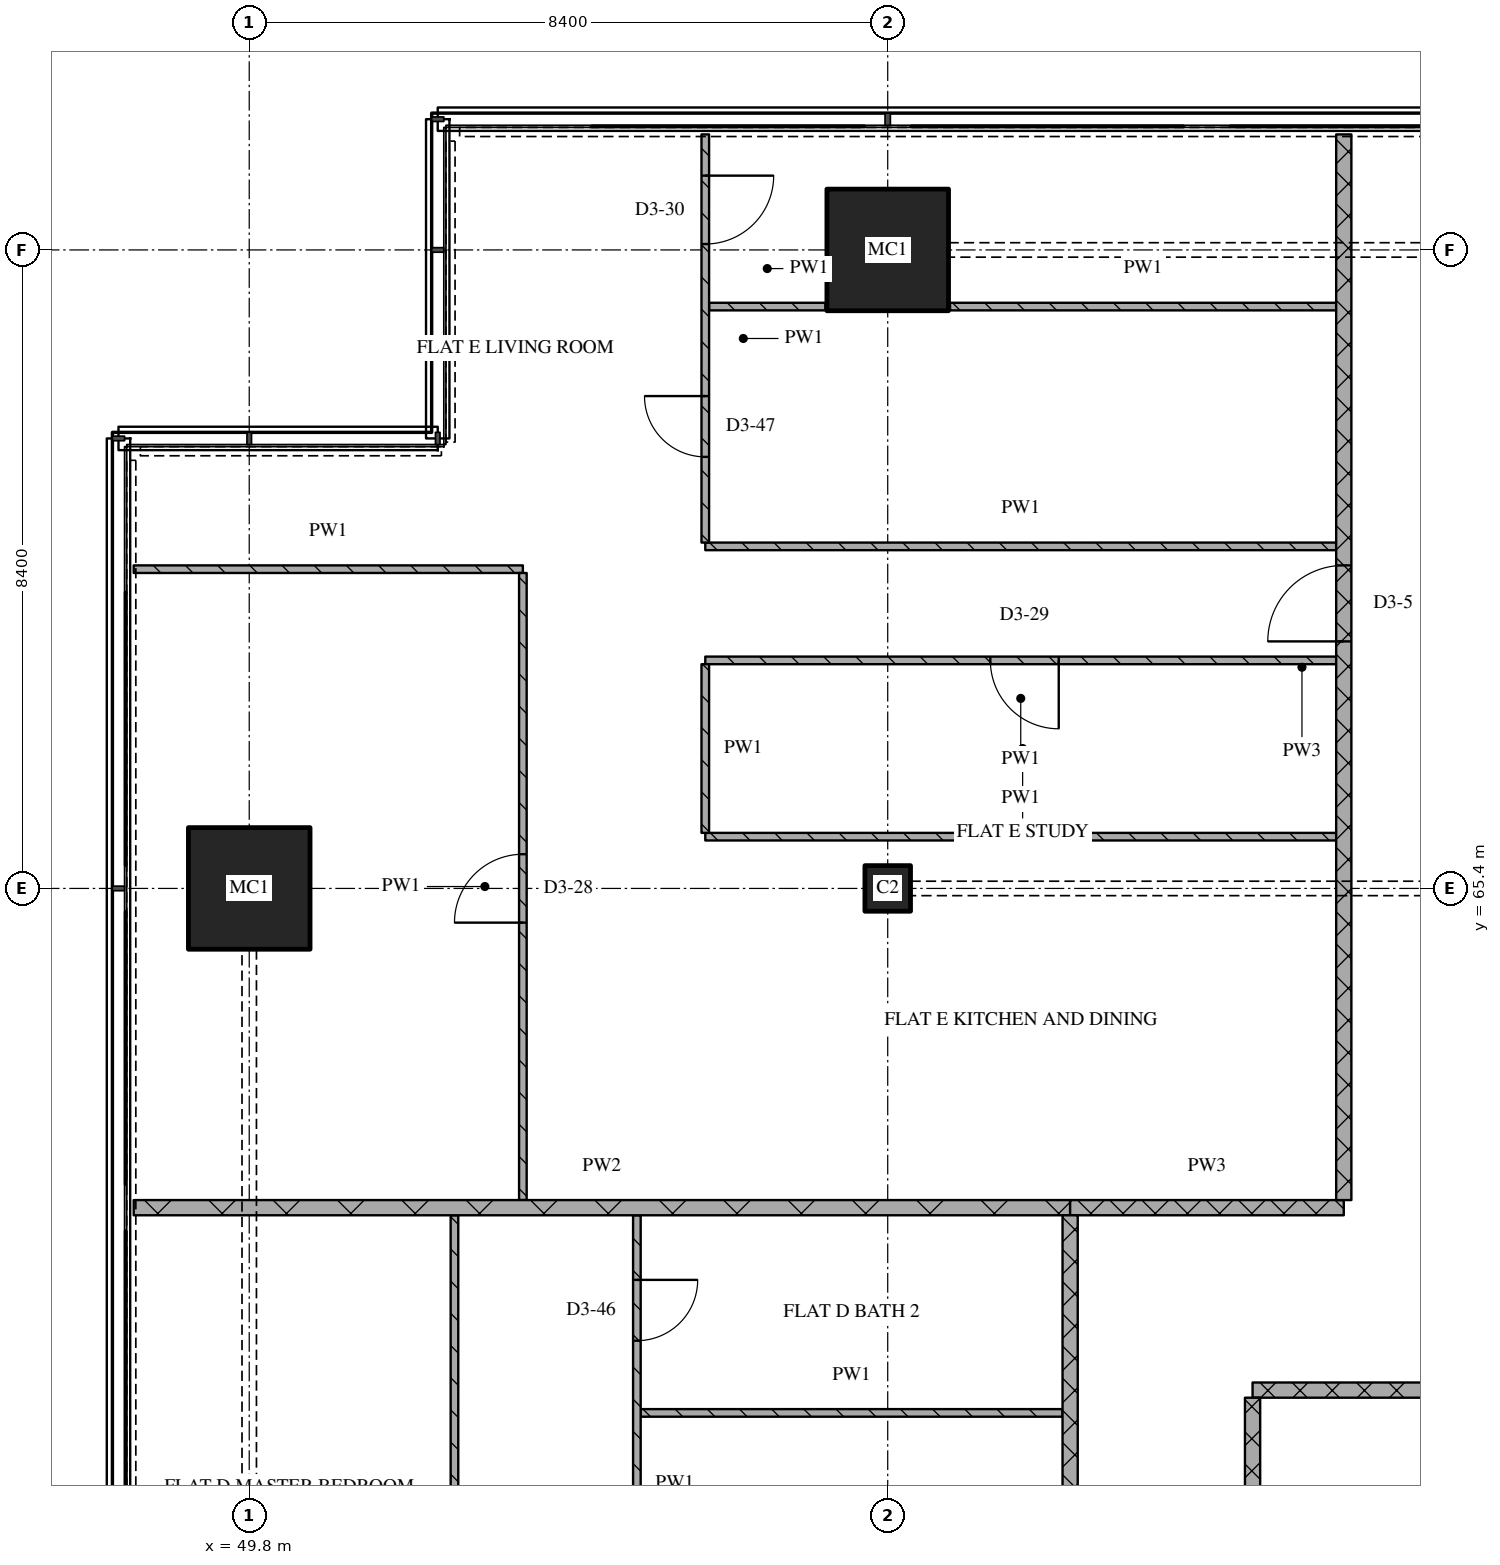
"""IFC4 building model, lengths in metres.
Left out: names, types, materials, properties, quantities, classifications, styles, units other than length and angle.
Written with IfcOpenShell. Run it as: python <this file> out.ifc"""

import sys

from ifc_helpers import new_model, si_unit, direction, frame, frame_2d, origin, origin_2d, place, context, subcontext, project, spatial, rectangle, extrude, element, fill, save


model = new_model("IFC4")
c1 = context("Model", 3, precision=1e-05, world=origin(), true_north=direction((0.0, 1.0)))
c2 = subcontext(c1, "Body", "Model", "MODEL_VIEW")
j1 = project(units=[si_unit("LENGTHUNIT", "METRE"), si_unit("PLANEANGLEUNIT", "RADIAN")], contexts=[c1])
p1 = place(None, origin())
s1 = spatial("IfcSite", under=j1, at=p1, CompositionType="ELEMENT")
p2 = place(p1, origin())
s2 = spatial("IfcBuilding", under=s1, at=p2, CompositionType="ELEMENT")
p3 = place(p2, frame((0.0, 0.0, 230.7)))
s3 = spatial("IfcBuildingStorey", under=s2, at=p3, CompositionType="ELEMENT", Elevation=230.7)
p4 = place(p3, frame((49.8, 65.4, 0.0), z_axis=(0.0, 0.0, 1.0), x_axis=(1.0, 0.0, 0.0)))
e1 = element("IfcColumn", 1, at=p4, inside=s3, PredefinedType="COLUMN", context=c2, shape_type="SweptSolid", body=[
    extrude(rectangle(XDim=1.6, YDim=1.6, at=origin_2d()), origin(), (0.0, 0.0, 1.0), 3.6),
])
p5 = place(p3, frame((58.2, 65.4, 0.0), z_axis=(0.0, 0.0, 1.0), x_axis=(1.0, 0.0, 0.0)))
e2 = element("IfcColumn", 2, at=p5, inside=s3, PredefinedType="COLUMN", context=c2, shape_type="SweptSolid", body=[
    extrude(rectangle(XDim=0.6, YDim=0.6, at=origin_2d()), origin(), (0.0, 0.0, 1.0), 3.6),
])
p6 = place(p3, frame((58.2, 73.8, 0.0), z_axis=(0.0, 0.0, 1.0), x_axis=(1.0, 0.0, 0.0)))
e3 = element("IfcColumn", 3, at=p6, inside=s3, PredefinedType="COLUMN", context=c2, shape_type="SweptSolid", body=[
    extrude(rectangle(XDim=1.6, YDim=1.6, at=origin_2d()), origin(), (0.0, 0.0, 1.0), 3.6),
])
p7 = place(p3, frame((54.95, 58.5, 0.0), z_axis=(0.0, 0.0, 1.0), x_axis=(1.0, 0.0, 0.0)))
e4 = element("IfcWall", 4, at=p7, inside=s3, PredefinedType="PARTITIONING", context=c2, shape_type="SweptSolid", body=[
    extrude(rectangle(XDim=5.55, YDim=0.1, at=frame_2d((2.775, 0.0))), origin(), (0.0, 0.0, 1.0), 3.32),
])
p8 = place(p3, frame((63.0, 58.8, 0.0), z_axis=(0.0, 0.0, 1.0), x_axis=(1.0, 0.0, 0.0)))
e5 = element("IfcWall", 5, at=p8, inside=s3, PredefinedType="PARTITIONING", context=c2, shape_type="SweptSolid", body=[
    extrude(rectangle(XDim=10.8, YDim=0.2, at=frame_2d((5.4, 0.0))), origin(), (0.0, 0.0, 1.0), 3.32),
])
p9 = place(p3, frame((60.6, 61.2, 0.0), z_axis=(0.0, 0.0, 1.0), x_axis=(1.0, 0.0, 0.0)))
e6 = element("IfcWall", 6, at=p9, inside=s3, PredefinedType="PARTITIONING", context=c2, shape_type="SweptSolid", body=[
    extrude(rectangle(XDim=3.6, YDim=0.2, at=frame_2d((1.8, 0.0))), origin(), (0.0, 0.0, 1.0), 3.32),
])
p10 = place(p3, frame((48.28, 61.2, 0.0), z_axis=(0.0, 0.0, 1.0), x_axis=(1.0, 0.0, 0.0)))
e7 = element("IfcWall", 7, at=p10, inside=s3, PredefinedType="PARTITIONING", context=c2, shape_type="SweptSolid", body=[
    extrude(rectangle(XDim=12.32, YDim=0.2, at=frame_2d((6.16, 0.0))), origin(), (0.0, 0.0, 1.0), 3.32),
])
p11 = place(p3, frame((55.8, 66.081, 0.0), z_axis=(0.0, 0.0, 1.0), x_axis=(1.0, 0.0, 0.0)))
e8 = element("IfcWall", 8, at=p11, inside=s3, PredefinedType="PARTITIONING", context=c2, shape_type="SweptSolid", body=[
    extrude(rectangle(XDim=8.3, YDim=0.1, at=frame_2d((4.15, 0.0))), origin(), (0.0, 0.0, 1.0), 3.32),
])
p12 = place(p3, frame((64.1, 68.4, 0.0), z_axis=(0.0, 0.0, 1.0), x_axis=(-1.0, 0.0, 0.0)))
e9 = element("IfcWall", 9, at=p12, inside=s3, PredefinedType="PARTITIONING", context=c2, shape_type="SweptSolid", body=[
    extrude(rectangle(XDim=8.3, YDim=0.1, at=frame_2d((4.15, 0.0))), origin(), (0.0, 0.0, 1.0), 3.32),
])
p13 = place(p12, frame((3.65, 0.0, 0.0)))
e10 = element("IfcOpeningElement", 10, at=p13, cuts=e9, PredefinedType="OPENING", context=c2, shape_type="SweptSolid", body=[
    extrude(rectangle(XDim=0.9, YDim=2.1, at=frame_2d((0.45, 1.05))), frame((0.0, 0.06, 0.0), z_axis=(0.0, -1.0, 0.0), x_axis=(1.0, 0.0, 0.0)), (0.0, 0.0, 1.0), 0.12),
])
p14 = place(p3, frame((48.28, 69.6, 0.0), z_axis=(0.0, 0.0, 1.0), x_axis=(1.0, 0.0, 0.0)))
e11 = element("IfcWall", 11, at=p14, inside=s3, PredefinedType="PARTITIONING", context=c2, shape_type="SweptSolid", body=[
    extrude(rectangle(XDim=5.12, YDim=0.1, at=frame_2d((2.56, 0.0))), origin(), (0.0, 0.0, 1.0), 3.32),
])
p15 = place(p3, frame((55.8, 69.9, 0.0), z_axis=(0.0, 0.0, 1.0), x_axis=(1.0, 0.0, 0.0)))
e12 = element("IfcWall", 12, at=p15, inside=s3, PredefinedType="PARTITIONING", context=c2, shape_type="SweptSolid", body=[
    extrude(rectangle(XDim=8.3, YDim=0.1, at=frame_2d((4.15, 0.0))), origin(), (0.0, 0.0, 1.0), 3.32),
])
p16 = place(p3, frame((55.85, 73.055, 0.0), z_axis=(0.0, 0.0, 1.0), x_axis=(1.0, 0.0, 0.0)))
e13 = element("IfcWall", 13, at=p16, inside=s3, PredefinedType="PARTITIONING", context=c2, shape_type="SweptSolid", body=[
    extrude(rectangle(XDim=1.53, YDim=0.1, at=frame_2d((0.765, 0.0))), origin(), (0.0, 0.0, 1.0), 3.32),
])
p17 = place(p3, frame((59.02, 73.055, 0.0), z_axis=(0.0, 0.0, 1.0), x_axis=(1.0, 0.0, 0.0)))
e14 = element("IfcWall", 14, at=p17, inside=s3, PredefinedType="PARTITIONING", context=c2, shape_type="SweptSolid", body=[
    extrude(rectangle(XDim=5.08, YDim=0.1, at=frame_2d((2.54, 0.0))), origin(), (0.0, 0.0, 1.0), 3.32),
])
p18 = place(p3, frame((52.5, 61.1, 0.0), z_axis=(0.0, 0.0, 1.0), x_axis=(0.0, -1.0, 0.0)))
e15 = element("IfcWall", 15, at=p18, inside=s3, PredefinedType="PARTITIONING", context=c2, shape_type="SweptSolid", body=[
    extrude(rectangle(XDim=8.25, YDim=0.1, at=frame_2d((4.125, 0.0))), origin(), (0.0, 0.0, 1.0), 3.32),
])
p19 = place(p3, frame((53.4, 61.3, 0.0), z_axis=(0.0, 0.0, 1.0), x_axis=(0.0, 1.0, 0.0)))
e16 = element("IfcWall", 16, at=p19, inside=s3, PredefinedType="PARTITIONING", context=c2, shape_type="SweptSolid", body=[
    extrude(rectangle(XDim=8.25, YDim=0.1, at=frame_2d((4.125, 0.0))), origin(), (0.0, 0.0, 1.0), 3.32),
])
p20 = place(p19, frame((3.65, 0.0, 0.0)))
e17 = element("IfcOpeningElement", 17, at=p20, cuts=e16, PredefinedType="OPENING", context=c2, shape_type="SweptSolid", body=[
    extrude(rectangle(XDim=0.9, YDim=2.1, at=frame_2d((0.45, 1.05))), frame((0.0, 0.06, 0.0), z_axis=(0.0, -1.0, 0.0), x_axis=(1.0, 0.0, 0.0)), (0.0, 0.0, 1.0), 0.12),
])
p21 = place(p3, frame((54.9, 61.1, 0.0), z_axis=(0.0, 0.0, 1.0), x_axis=(0.0, -1.0, 0.0)))
e18 = element("IfcWall", 18, at=p21, inside=s3, PredefinedType="PARTITIONING", context=c2, shape_type="SweptSolid", body=[
    extrude(rectangle(XDim=7.05, YDim=0.1, at=frame_2d((3.525, 0.0))), origin(), (0.0, 0.0, 1.0), 3.32),
])
p22 = place(p21, frame((0.85, 0.0, 0.0)))
e19 = element("IfcOpeningElement", 19, at=p22, cuts=e18, PredefinedType="OPENING", context=c2, shape_type="SweptSolid", body=[
    extrude(rectangle(XDim=0.8, YDim=2.1, at=frame_2d((0.4, 1.05))), frame((0.0, 0.06, 0.0), z_axis=(0.0, -1.0, 0.0), x_axis=(1.0, 0.0, 0.0)), (0.0, 0.0, 1.0), 0.12),
])
p23 = place(p3, frame((55.8, 68.35, 0.0), z_axis=(0.0, 0.0, 1.0), x_axis=(0.0, -1.0, 0.0)))
e20 = element("IfcWall", 20, at=p23, inside=s3, PredefinedType="PARTITIONING", context=c2, shape_type="SweptSolid", body=[
    extrude(rectangle(XDim=2.219, YDim=0.1, at=frame_2d((1.109, 0.0))), origin(), (0.0, 0.0, 1.0), 3.32),
])
p24 = place(p3, frame((55.8, 75.32, 0.0), z_axis=(0.0, 0.0, 1.0), x_axis=(0.0, -1.0, 0.0)))
e21 = element("IfcWall", 21, at=p24, inside=s3, PredefinedType="PARTITIONING", context=c2, shape_type="SweptSolid", body=[
    extrude(rectangle(XDim=5.37, YDim=0.1, at=frame_2d((2.685, 0.0))), origin(), (0.0, 0.0, 1.0), 3.32),
])
p25 = place(p24, frame((0.542, 0.0, 0.0)))
e22 = element("IfcOpeningElement", 22, at=p25, cuts=e21, PredefinedType="OPENING", context=c2, shape_type="SweptSolid", body=[
    extrude(rectangle(XDim=0.9, YDim=2.1, at=frame_2d((0.45, 1.05))), frame((0.0, 0.06, 0.0), z_axis=(0.0, -1.0, 0.0), x_axis=(1.0, 0.0, 0.0)), (0.0, 0.0, 1.0), 0.12),
])
p26 = place(p24, frame((3.443, 0.0, 0.0)))
e23 = element("IfcOpeningElement", 23, at=p26, cuts=e21, PredefinedType="OPENING", context=c2, shape_type="SweptSolid", body=[
    extrude(rectangle(XDim=0.8, YDim=2.1, at=frame_2d((0.4, 1.05))), frame((0.0, 0.06, 0.0), z_axis=(0.0, -1.0, 0.0), x_axis=(1.0, 0.0, 0.0)), (0.0, 0.0, 1.0), 0.12),
])
p27 = place(p3, frame((60.6, 43.3, 0.0), z_axis=(0.0, 0.0, 1.0), x_axis=(0.0, 1.0, 0.0)))
e24 = element("IfcWall", 24, at=p27, inside=s3, PredefinedType="PARTITIONING", context=c2, shape_type="SweptSolid", body=[
    extrude(rectangle(XDim=17.8, YDim=0.2, at=frame_2d((8.9, 0.0))), origin(), (0.0, 0.0, 1.0), 3.32),
])
p28 = place(p27, frame((9.45, 0.0, 0.0)))
e25 = element("IfcOpeningElement", 25, at=p28, cuts=e24, PredefinedType="OPENING", context=c2, shape_type="SweptSolid", body=[
    extrude(rectangle(XDim=1.0, YDim=2.1, at=frame_2d((0.5, 1.05))), frame((0.0, 0.11, 0.0), z_axis=(0.0, -1.0, 0.0), x_axis=(1.0, 0.0, 0.0)), (0.0, 0.0, 1.0), 0.22),
])
p29 = place(p3, frame((63.0, 58.7, 0.0), z_axis=(0.0, 0.0, 1.0), x_axis=(0.0, -1.0, 0.0)))
e26 = element("IfcWall", 26, at=p29, inside=s3, PredefinedType="PARTITIONING", context=c2, shape_type="SweptSolid", body=[
    extrude(rectangle(XDim=15.4, YDim=0.2, at=frame_2d((7.7, 0.0))), origin(), (0.0, 0.0, 1.0), 3.32),
])
p30 = place(p29, frame((4.35, 0.0, 0.0)))
e27 = element("IfcOpeningElement", 27, at=p30, cuts=e26, PredefinedType="OPENING", context=c2, shape_type="SweptSolid", body=[
    extrude(rectangle(XDim=1.0, YDim=2.1, at=frame_2d((0.5, 1.05))), frame((0.0, 0.11, 0.0), z_axis=(0.0, -1.0, 0.0), x_axis=(1.0, 0.0, 0.0)), (0.0, 0.0, 1.0), 0.22),
])
p31 = place(p29, frame((11.25, 0.0, 0.0)))
e28 = element("IfcOpeningElement", 28, at=p31, cuts=e26, PredefinedType="OPENING", context=c2, shape_type="SweptSolid", body=[
    extrude(rectangle(XDim=0.9, YDim=2.1, at=frame_2d((0.45, 1.05))), frame((0.0, 0.11, 0.0), z_axis=(0.0, -1.0, 0.0), x_axis=(1.0, 0.0, 0.0)), (0.0, 0.0, 1.0), 0.22),
])
p32 = place(p3, frame((64.2, 61.3, 0.0), z_axis=(0.0, 0.0, 1.0), x_axis=(0.0, 1.0, 0.0)))
e29 = element("IfcWall", 29, at=p32, inside=s3, PredefinedType="PARTITIONING", context=c2, shape_type="SweptSolid", body=[
    extrude(rectangle(XDim=14.02, YDim=0.2, at=frame_2d((7.01, 0.0))), origin(), (0.0, 0.0, 1.0), 3.32),
])
p33 = place(p32, frame((7.35, 0.0, 0.0)))
e30 = element("IfcOpeningElement", 30, at=p33, cuts=e29, PredefinedType="OPENING", context=c2, shape_type="SweptSolid", body=[
    extrude(rectangle(XDim=1.0, YDim=2.1, at=frame_2d((0.5, 1.05))), frame((0.0, 0.11, 0.0), z_axis=(0.0, -1.0, 0.0), x_axis=(1.0, 0.0, 0.0)), (0.0, 0.0, 1.0), 0.22),
])
p34 = place(p13, origin())
e31 = element("IfcDoor", 31, at=p34, inside=s3, OperationType="SINGLE_SWING_LEFT", PredefinedType="DOOR", context=c2, shape_type="SweptSolid", body=[
    extrude(rectangle(XDim=0.9, YDim=2.1, at=frame_2d((0.45, 1.05))), frame((0.0, 0.025, 0.0), z_axis=(0.0, -1.0, 0.0), x_axis=(1.0, 0.0, 0.0)), (0.0, 0.0, 1.0), 0.05),
])
fill(e10, e31)
p35 = place(p20, origin())
e32 = element("IfcDoor", 32, at=p35, inside=s3, OperationType="SINGLE_SWING_LEFT", PredefinedType="DOOR", context=c2, shape_type="SweptSolid", body=[
    extrude(rectangle(XDim=0.9, YDim=2.1, at=frame_2d((0.45, 1.05))), frame((0.0, 0.025, 0.0), z_axis=(0.0, -1.0, 0.0), x_axis=(1.0, 0.0, 0.0)), (0.0, 0.0, 1.0), 0.05),
])
fill(e17, e32)
p36 = place(p22, origin())
e33 = element("IfcDoor", 33, at=p36, inside=s3, OperationType="SINGLE_SWING_LEFT", PredefinedType="DOOR", context=c2, shape_type="SweptSolid", body=[
    extrude(rectangle(XDim=0.8, YDim=2.1, at=frame_2d((0.4, 1.05))), frame((0.0, 0.025, 0.0), z_axis=(0.0, -1.0, 0.0), x_axis=(1.0, 0.0, 0.0)), (0.0, 0.0, 1.0), 0.05),
])
fill(e19, e33)
p37 = place(p25, origin())
e34 = element("IfcDoor", 34, at=p37, inside=s3, OperationType="SINGLE_SWING_LEFT", PredefinedType="DOOR", context=c2, shape_type="SweptSolid", body=[
    extrude(rectangle(XDim=0.9, YDim=2.1, at=frame_2d((0.45, 1.05))), frame((0.0, 0.025, 0.0), z_axis=(0.0, -1.0, 0.0), x_axis=(1.0, 0.0, 0.0)), (0.0, 0.0, 1.0), 0.05),
])
fill(e22, e34)
p38 = place(p26, origin())
e35 = element("IfcDoor", 35, at=p38, inside=s3, OperationType="SINGLE_SWING_RIGHT", PredefinedType="DOOR", context=c2, shape_type="SweptSolid", body=[
    extrude(rectangle(XDim=0.8, YDim=2.1, at=frame_2d((0.4, 1.05))), frame((0.0, 0.025, 0.0), z_axis=(0.0, -1.0, 0.0), x_axis=(1.0, 0.0, 0.0)), (0.0, 0.0, 1.0), 0.05),
])
fill(e23, e35)
p39 = place(p33, origin())
e36 = element("IfcDoor", 36, at=p39, inside=s3, OperationType="SINGLE_SWING_LEFT", PredefinedType="DOOR", context=c2, shape_type="SweptSolid", body=[
    extrude(rectangle(XDim=1.0, YDim=2.1, at=frame_2d((0.5, 1.05))), frame((0.0, 0.025, 0.0), z_axis=(0.0, -1.0, 0.0), x_axis=(1.0, 0.0, 0.0)), (0.0, 0.0, 1.0), 0.05),
])
fill(e30, e36)
save(model, sys.argv[1])
